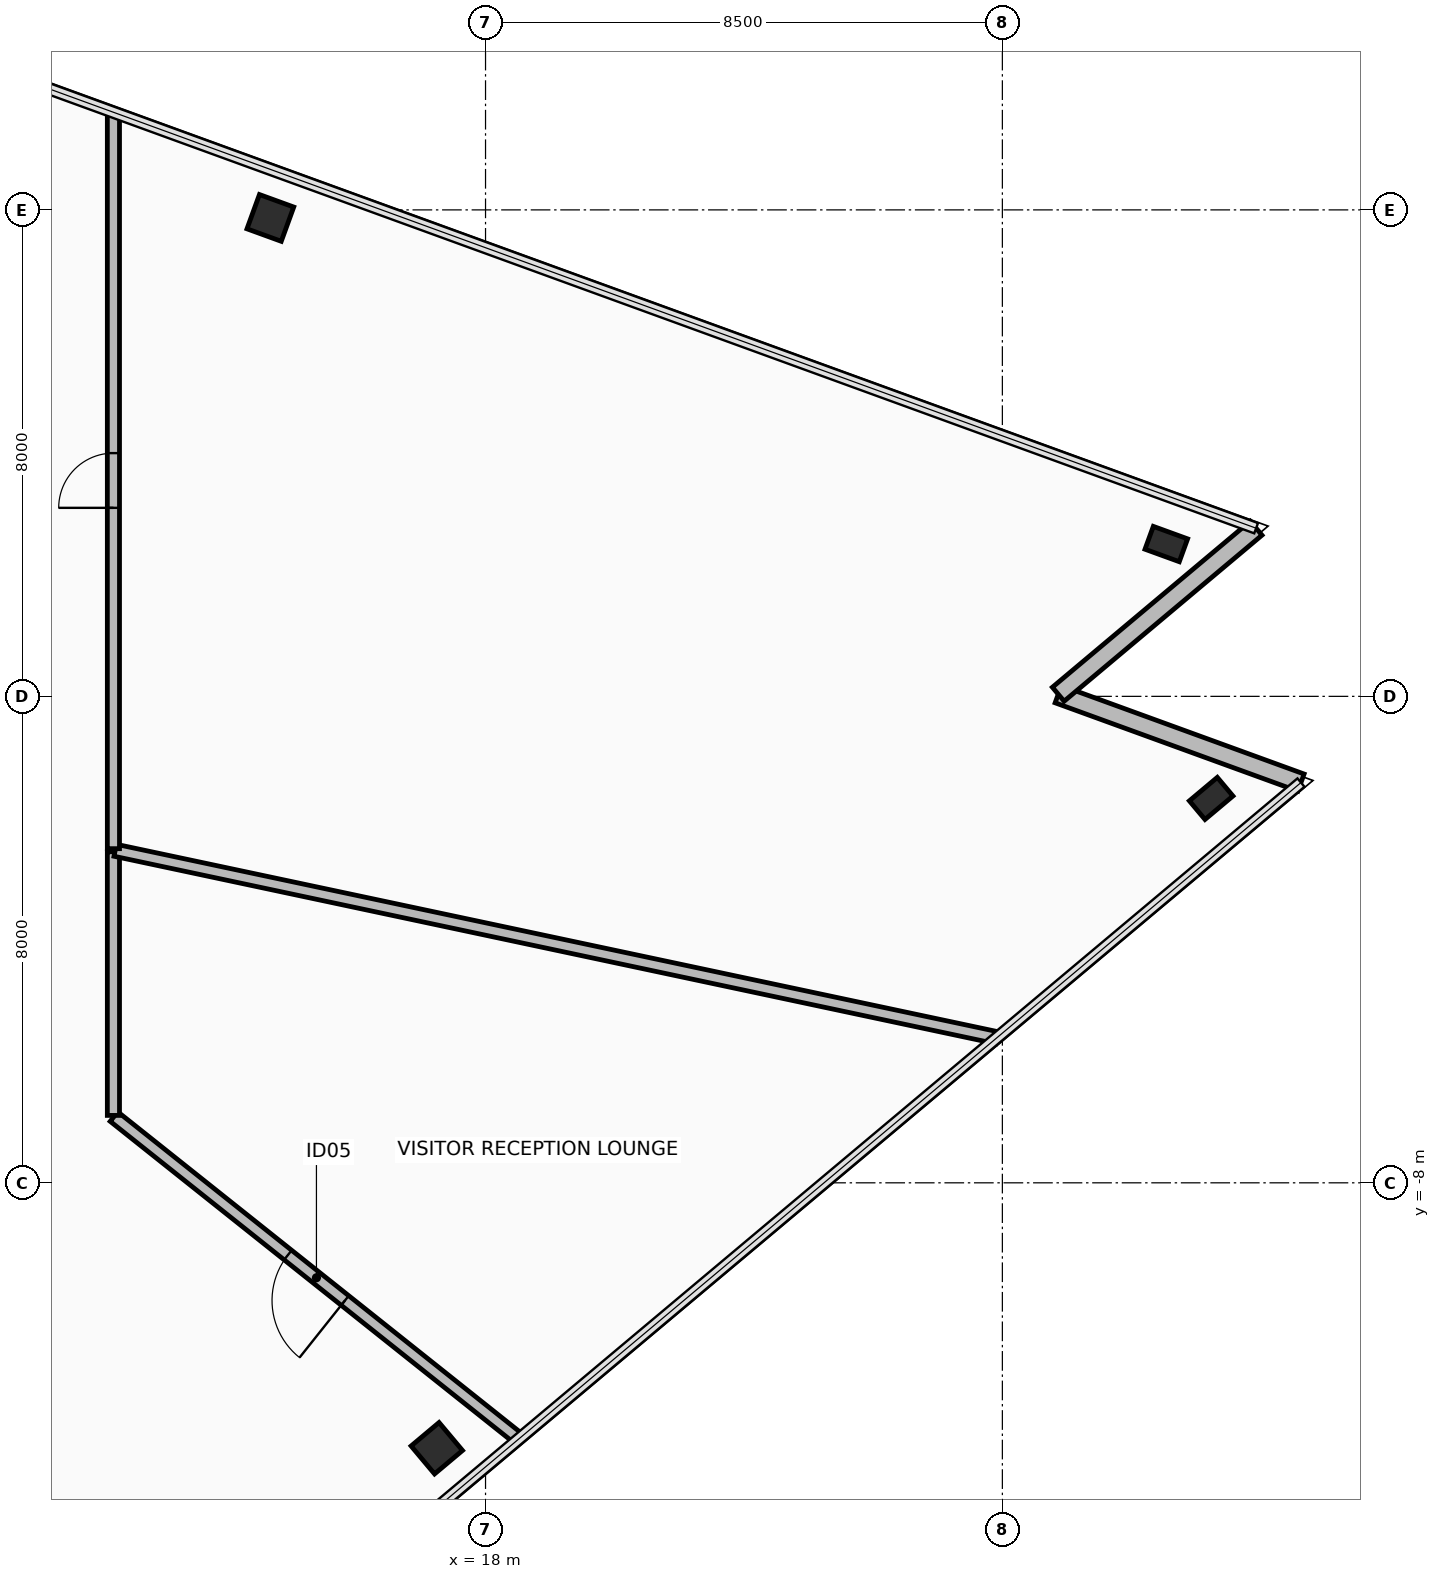
"""IFC4 building model, lengths in metres.
Left out: names, types, materials, properties, quantities, classifications, styles, units other than length and angle.
Written with IfcOpenShell. Run it as: python <this file> out.ifc"""

import sys

from ifc_helpers import new_model, si_unit, direction, frame, frame_2d, origin, origin_2d, place, context, subcontext, project, spatial, rectangle, hollow_rectangle, extrude, element, fill, save


model = new_model("IFC4")
c1 = context("Model", 3, precision=1e-05, world=origin(), true_north=direction((0.0, 1.0)))
c2 = subcontext(c1, "Body", "Model", "MODEL_VIEW")
j1 = project(units=[si_unit("LENGTHUNIT", "METRE"), si_unit("PLANEANGLEUNIT", "RADIAN")], contexts=[c1])
p1 = place(None, origin())
s1 = spatial("IfcSite", under=j1, at=p1, CompositionType="ELEMENT")
p2 = place(p1, origin())
s2 = spatial("IfcBuilding", under=s1, at=p2, CompositionType="ELEMENT")
p3 = place(p2, frame((0.0, 0.0, 170.5)))
s3 = spatial("IfcBuildingStorey", under=s2, at=p3, CompositionType="ELEMENT", Elevation=170.5)
p4 = place(p3, frame((17.198, -12.365, 0.0), z_axis=(0.0, 0.0, 1.0), x_axis=(0.766043321242, 0.642788946685, 0.0)))
e1 = element("IfcColumn", 1, at=p4, inside=s3, PredefinedType="COLUMN", context=c2, shape_type="SweptSolid", body=[
    extrude(hollow_rectangle(XDim=0.6, YDim=0.6, WallThickness=0.036, at=origin_2d()), origin(), (0.0, 0.0, 1.0), 3.6),
])
for number, where, z_axis, x_axis in (
    (2, (29.934, -1.679, 0.0), (0.0, 0.0, 1.0), (0.766, 0.643, 0.0)),
    (3, (29.196, 2.505, 0.0), (0.0, 0.0, 1.0), (-0.94, 0.342, 0.0)),
):
    element("IfcColumn", number, at=place(p3, frame(where, z_axis=z_axis, x_axis=x_axis)), inside=s3, PredefinedType="COLUMN", context=c2, shape_type="SweptSolid", body=[
        extrude(hollow_rectangle(XDim=0.4, YDim=0.6, WallThickness=0.03, at=origin_2d()), origin(), (0.0, 0.0, 1.0), 3.6),
    ])
p5 = place(p3, frame((14.461, 7.868, 0.0), z_axis=(0.0, 0.0, 1.0), x_axis=(-0.939692023847, 0.342021783398, 0.0)))
e4 = element("IfcColumn", 4, at=p5, inside=s3, PredefinedType="COLUMN", context=c2, shape_type="SweptSolid", body=[
    extrude(hollow_rectangle(XDim=0.6, YDim=0.6, WallThickness=0.036, at=origin_2d()), origin(), (0.0, 0.0, 1.0), 3.6),
])
for number, where, z_axis, x_axis in (
    (5, (31.411, -1.418, 0.0), (0.0, 0.0, 1.0), (-0.94, 0.342, 0.0)),
    (6, (27.419, 0.035, 0.0), (0.0, 0.0, 1.0), (0.766, 0.643, 0.0)),
):
    element("IfcWall", number, at=place(p3, frame(where, z_axis=z_axis, x_axis=x_axis)), inside=s3, PredefinedType="STANDARD", context=c2, shape_type="SweptSolid", body=[
        extrude(rectangle(XDim=4.248, YDim=0.3, at=frame_2d((2.124, 0.0))), origin(), (0.0, 0.0, 1.0), 2.715),
    ])
p6 = place(p3, frame((7.144, -10.591, 0.0), z_axis=(0.0, 0.0, 1.0), x_axis=(0.559187972466, -0.829040898539, 0.0)))
e7 = element("IfcWall", 7, at=p6, inside=s3, PredefinedType="PARTITIONING", context=c2, shape_type="SweptSolid", body=[
    extrude(rectangle(XDim=8.597, YDim=0.2, at=frame_2d((4.298, 0.0))), origin(), (0.0, 0.0, 1.0), 2.715),
])
p7 = place(p3, frame((18.548, -12.211, 0.0), z_axis=(0.0, 0.0, 1.0), x_axis=(-0.782380574332, 0.622800639778, 0.0)))
e8 = element("IfcWall", 8, at=p7, inside=s3, PredefinedType="PARTITIONING", context=c2, shape_type="SweptSolid", body=[
    extrude(rectangle(XDim=8.511, YDim=0.2, at=frame_2d((4.255, 0.0))), origin(), (0.0, 0.0, 1.0), 2.715),
])
p8 = place(p7, frame((3.655, 0.0, 0.0)))
e9 = element("IfcOpeningElement", 9, at=p8, cuts=e8, PredefinedType="OPENING", context=c2, shape_type="SweptSolid", body=[
    extrude(rectangle(XDim=1.2, YDim=2.15, at=frame_2d((0.6, 1.075))), frame((0.0, 0.11, 0.0), z_axis=(0.0, -1.0, 0.0), x_axis=(1.0, 0.0, 0.0)), (0.0, 0.0, 1.0), 0.22),
])
p9 = place(p3, frame((11.88, -6.891, 0.0), z_axis=(0.0, 0.0, 1.0), x_axis=(0.0, 1.0, 0.0)))
e10 = element("IfcWall", 10, at=p9, inside=s3, PredefinedType="PARTITIONING", context=c2, shape_type="SweptSolid", body=[
    extrude(rectangle(XDim=4.335, YDim=0.2, at=frame_2d((2.168, 0.0))), origin(), (0.0, 0.0, 1.0), 2.865),
])
p10 = place(p3, frame((11.91, -2.531, 0.0), z_axis=(0.0, 0.0, 1.0), x_axis=(0.978146920781, -0.207914889719, 0.0)))
e11 = element("IfcWall", 11, at=p10, inside=s3, PredefinedType="PARTITIONING", context=c2, shape_type="SweptSolid", body=[
    extrude(rectangle(XDim=14.825, YDim=0.2, at=frame_2d((7.412, 0.0))), origin(), (0.0, 0.0, 1.0), 2.715),
])
p11 = place(p3, frame((11.88, -2.505, 0.0), z_axis=(0.0, 0.0, 1.0), x_axis=(0.0, 1.0, 0.0)))
e12 = element("IfcWall", 12, at=p11, inside=s3, PredefinedType="PARTITIONING", context=c2, shape_type="SweptSolid", body=[
    extrude(rectangle(XDim=12.111, YDim=0.2, at=frame_2d((6.055, 0.0))), origin(), (0.0, 0.0, 1.0), 2.715),
])
p12 = place(p11, frame((5.605, 0.0, 0.0)))
e13 = element("IfcOpeningElement", 13, at=p12, cuts=e12, PredefinedType="OPENING", context=c2, shape_type="SweptSolid", body=[
    extrude(rectangle(XDim=0.9, YDim=2.1, at=frame_2d((0.45, 1.05))), frame((0.0, 0.11, 0.0), z_axis=(0.0, -1.0, 0.0), x_axis=(1.0, 0.0, 0.0)), (0.0, 0.0, 1.0), 0.22),
])
p13 = place(p8, origin())
e14 = element("IfcDoor", 14, at=p13, inside=s3, OperationType="SINGLE_SWING_LEFT", PredefinedType="DOOR", context=c2, shape_type="SweptSolid", body=[
    extrude(rectangle(XDim=1.2, YDim=2.15, at=frame_2d((0.6, 1.075))), frame((0.0, 0.025, 0.0), z_axis=(0.0, -1.0, 0.0), x_axis=(1.0, 0.0, 0.0)), (0.0, 0.0, 1.0), 0.05),
])
fill(e9, e14)
p14 = place(p12, origin())
e15 = element("IfcDoor", 15, at=p14, inside=s3, OperationType="SINGLE_SWING_LEFT", PredefinedType="DOOR", context=c2, shape_type="SweptSolid", body=[
    extrude(rectangle(XDim=0.9, YDim=2.1, at=frame_2d((0.45, 1.05))), frame((0.0, 0.025, 0.0), z_axis=(0.0, -1.0, 0.0), x_axis=(1.0, 0.0, 0.0)), (0.0, 0.0, 1.0), 0.05),
])
fill(e13, e15)
save(model, sys.argv[1])
